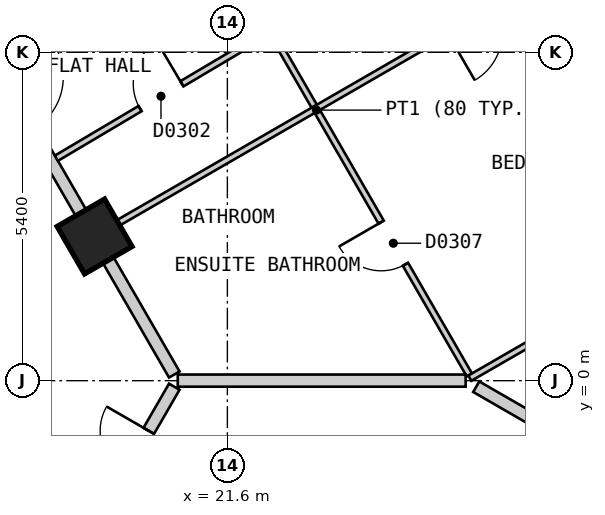
"""IFC4 building model, lengths in metres.
Left out: names, types, materials, properties, quantities, classifications, styles, units other than length and angle.
Written with IfcOpenShell. Run it as: python <this file> out.ifc"""

import sys

from ifc_helpers import new_model, si_unit, direction, frame, frame_2d, origin, origin_2d, place, context, subcontext, project, spatial, polyline, rectangle, outline, extrude, element, fill, save


model = new_model("IFC4")
c1 = context("Model", 3, precision=1e-05, world=origin(), true_north=direction((0.0, 1.0)))
c2 = subcontext(c1, "Body", "Model", "MODEL_VIEW")
j1 = project(units=[si_unit("LENGTHUNIT", "METRE"), si_unit("PLANEANGLEUNIT", "RADIAN")], contexts=[c1])
p1 = place(None, origin())
s1 = spatial("IfcSite", under=j1, at=p1, CompositionType="ELEMENT")
p2 = place(p1, origin())
s2 = spatial("IfcBuilding", under=s1, at=p2, CompositionType="ELEMENT")
p3 = place(p2, frame((0.0, 0.0, 59.4)))
s3 = spatial("IfcBuildingStorey", under=s2, at=p3, CompositionType="ELEMENT", Elevation=59.4)
p4 = place(p3, frame((19.416, 2.371, 0.0), z_axis=(0.0, 0.0, 1.0), x_axis=(-0.499984884929, 0.866034130299, 0.0)))
e1 = element("IfcColumn", 1, at=p4, inside=s3, PredefinedType="COLUMN", context=c2, shape_type="SweptSolid", body=[
    extrude(rectangle(XDim=0.9, YDim=0.9, at=origin_2d()), origin(), (0.0, 0.0, 1.0), 3.0),
])
p5 = place(p3, frame((31.22, 2.425, 0.0), z_axis=(0.0, 0.0, 1.0), x_axis=(-0.500001938803, 0.866024284413, 0.0)))
e2 = element("IfcWall", 2, at=p5, inside=s3, PredefinedType="SOLIDWALL", context=c2, shape_type="SweptSolid", body=[
    extrude(outline(polyline([(0.0, -0.15), (27.02, -0.15), (26.94, 0.15), (0.08, 0.15), (0.0, -0.15)])), origin(), (0.0, 0.0, 1.0), 2.6),
])
p6 = place(p5, frame((1.277, 0.0, 0.15)))
e3 = element("IfcOpeningElement", 3, at=p6, cuts=e2, PredefinedType="OPENING", context=c2, shape_type="SweptSolid", body=[
    extrude(rectangle(XDim=1.5, YDim=2.1, at=frame_2d((0.75, 1.05))), frame((0.0, 0.16, 0.0), z_axis=(0.0, -1.0, 0.0), x_axis=(1.0, 0.0, 0.0)), (0.0, 0.0, 1.0), 0.32),
])
p7 = place(p5, frame((3.829, 0.0, 0.15)))
e4 = element("IfcOpeningElement", 4, at=p7, cuts=e2, PredefinedType="OPENING", context=c2, shape_type="SweptSolid", body=[
    extrude(rectangle(XDim=1.5, YDim=2.1, at=frame_2d((0.75, 1.05))), frame((0.0, 0.16, 0.0), z_axis=(0.0, -1.0, 0.0), x_axis=(1.0, 0.0, 0.0)), (0.0, 0.0, 1.0), 0.32),
])
p8 = place(p5, frame((6.382, 0.0, 0.15)))
e5 = element("IfcOpeningElement", 5, at=p8, cuts=e2, PredefinedType="OPENING", context=c2, shape_type="SweptSolid", body=[
    extrude(rectangle(XDim=1.5, YDim=2.1, at=frame_2d((0.75, 1.05))), frame((0.0, 0.16, 0.0), z_axis=(0.0, -1.0, 0.0), x_axis=(1.0, 0.0, 0.0)), (0.0, 0.0, 1.0), 0.32),
])
p9 = place(p5, frame((8.933, 0.0, 0.15)))
e6 = element("IfcOpeningElement", 6, at=p9, cuts=e2, PredefinedType="OPENING", context=c2, shape_type="SweptSolid", body=[
    extrude(rectangle(XDim=1.5, YDim=2.1, at=frame_2d((0.75, 1.05))), frame((0.0, 0.16, 0.0), z_axis=(0.0, -1.0, 0.0), x_axis=(1.0, 0.0, 0.0)), (0.0, 0.0, 1.0), 0.32),
])
p10 = place(p5, frame((11.485, 0.0, 0.15)))
e7 = element("IfcOpeningElement", 7, at=p10, cuts=e2, PredefinedType="OPENING", context=c2, shape_type="SweptSolid", body=[
    extrude(rectangle(XDim=1.5, YDim=2.1, at=frame_2d((0.75, 1.05))), frame((0.0, 0.16, 0.0), z_axis=(0.0, -1.0, 0.0), x_axis=(1.0, 0.0, 0.0)), (0.0, 0.0, 1.0), 0.32),
])
p11 = place(p5, frame((14.037, 0.0, 0.15)))
e8 = element("IfcOpeningElement", 8, at=p11, cuts=e2, PredefinedType="OPENING", context=c2, shape_type="SweptSolid", body=[
    extrude(rectangle(XDim=1.5, YDim=2.1, at=frame_2d((0.75, 1.05))), frame((0.0, 0.16, 0.0), z_axis=(0.0, -1.0, 0.0), x_axis=(1.0, 0.0, 0.0)), (0.0, 0.0, 1.0), 0.32),
])
p12 = place(p5, frame((16.589, 0.0, 0.15)))
e9 = element("IfcOpeningElement", 9, at=p12, cuts=e2, PredefinedType="OPENING", context=c2, shape_type="SweptSolid", body=[
    extrude(rectangle(XDim=1.5, YDim=2.1, at=frame_2d((0.75, 1.05))), frame((0.0, 0.16, 0.0), z_axis=(0.0, -1.0, 0.0), x_axis=(1.0, 0.0, 0.0)), (0.0, 0.0, 1.0), 0.32),
])
p13 = place(p5, frame((19.141, 0.0, 0.15)))
e10 = element("IfcOpeningElement", 10, at=p13, cuts=e2, PredefinedType="OPENING", context=c2, shape_type="SweptSolid", body=[
    extrude(rectangle(XDim=1.5, YDim=2.1, at=frame_2d((0.75, 1.05))), frame((0.0, 0.16, 0.0), z_axis=(0.0, -1.0, 0.0), x_axis=(1.0, 0.0, 0.0)), (0.0, 0.0, 1.0), 0.32),
])
p14 = place(p5, frame((21.693, 0.0, 0.15)))
e11 = element("IfcOpeningElement", 11, at=p14, cuts=e2, PredefinedType="OPENING", context=c2, shape_type="SweptSolid", body=[
    extrude(rectangle(XDim=1.5, YDim=2.1, at=frame_2d((0.75, 1.05))), frame((0.0, 0.16, 0.0), z_axis=(0.0, -1.0, 0.0), x_axis=(1.0, 0.0, 0.0)), (0.0, 0.0, 1.0), 0.32),
])
p15 = place(p5, frame((24.244, 0.0, 0.15)))
e12 = element("IfcOpeningElement", 12, at=p15, cuts=e2, PredefinedType="OPENING", context=c2, shape_type="SweptSolid", body=[
    extrude(rectangle(XDim=1.5, YDim=2.1, at=frame_2d((0.75, 1.05))), frame((0.0, 0.16, 0.0), z_axis=(0.0, -1.0, 0.0), x_axis=(1.0, 0.0, 0.0)), (0.0, 0.0, 1.0), 0.32),
])
p16 = place(p3, frame((10.45, 17.9, 0.0), z_axis=(0.0, 0.0, 1.0), x_axis=(0.500034352617, -0.866005569383, 0.0)))
e13 = element("IfcWall", 13, at=p16, inside=s3, PredefinedType="PARTITIONING", context=c2, shape_type="SweptSolid", body=[
    extrude(rectangle(XDim=20.553, YDim=0.2, at=frame_2d((10.276, 0.0))), origin(), (0.0, 0.0, 1.0), 2.6),
])
p17 = place(p16, frame((14.903, 0.0, 0.0)))
e14 = element("IfcOpeningElement", 14, at=p17, cuts=e13, PredefinedType="OPENING", context=c2, shape_type="SweptSolid", body=[
    extrude(rectangle(XDim=1.0, YDim=2.1, at=frame_2d((0.5, 1.05))), frame((0.0, 0.11, 0.0), z_axis=(0.0, -1.0, 0.0), x_axis=(1.0, 0.0, 0.0)), (0.0, 0.0, 1.0), 0.22),
])
p18 = place(p16, frame((9.775, 0.0, 0.0)))
e15 = element("IfcOpeningElement", 15, at=p18, cuts=e13, PredefinedType="OPENING", context=c2, shape_type="SweptSolid", body=[
    extrude(rectangle(XDim=1.0, YDim=2.1, at=frame_2d((0.5, 1.05))), frame((0.0, 0.11, 0.0), z_axis=(0.0, -1.0, 0.0), x_axis=(1.0, 0.0, 0.0)), (0.0, 0.0, 1.0), 0.22),
])
p19 = place(p16, frame((0.852, 0.0, 0.0)))
e16 = element("IfcOpeningElement", 16, at=p19, cuts=e13, PredefinedType="OPENING", context=c2, shape_type="SweptSolid", body=[
    extrude(rectangle(XDim=0.8, YDim=2.1, at=frame_2d((0.4, 1.05))), frame((0.0, 0.11, 0.0), z_axis=(0.0, -1.0, 0.0), x_axis=(1.0, 0.0, 0.0)), (0.0, 0.0, 1.0), 0.22),
])
p20 = place(p3, frame((16.914, -6.703, 0.0), z_axis=(0.0, 0.0, 1.0), x_axis=(0.50003007663, 0.866008038338, 0.0)))
e17 = element("IfcWall", 17, at=p20, inside=s3, PredefinedType="PARTITIONING", context=c2, shape_type="SweptSolid", body=[
    extrude(rectangle(XDim=7.625, YDim=0.2, at=frame_2d((3.813, 0.0))), origin(), (0.0, 0.0, 1.0), 2.6),
])
p21 = place(p20, frame((1.952, 0.0, 0.0)))
e18 = element("IfcOpeningElement", 18, at=p21, cuts=e17, PredefinedType="OPENING", context=c2, shape_type="SweptSolid", body=[
    extrude(rectangle(XDim=1.0, YDim=2.1, at=frame_2d((0.5, 1.05))), frame((0.0, 0.11, 0.0), z_axis=(0.0, -1.0, 0.0), x_axis=(1.0, 0.0, 0.0)), (0.0, 0.0, 1.0), 0.22),
])
p22 = place(p20, frame((5.987, 0.0, 0.0)))
e19 = element("IfcOpeningElement", 19, at=p22, cuts=e17, PredefinedType="OPENING", context=c2, shape_type="SweptSolid", body=[
    extrude(rectangle(XDim=0.8, YDim=2.1, at=frame_2d((0.4, 1.05))), frame((0.0, 0.11, 0.0), z_axis=(0.0, -1.0, 0.0), x_axis=(1.0, 0.0, 0.0)), (0.0, 0.0, 1.0), 0.22),
])
p23 = place(p3, frame((20.551, 8.805, 0.0), z_axis=(0.0, 0.0, 1.0), x_axis=(0.499984387913, -0.86603441724, 0.0)))
e20 = element("IfcWall", 20, at=p23, inside=s3, PredefinedType="PARTITIONING", context=c2, shape_type="SweptSolid", body=[
    extrude(rectangle(XDim=10.058, YDim=0.1, at=frame_2d((5.029, 0.0))), origin(), (0.0, 0.0, 1.0), 2.6),
])
p24 = place(p23, frame((1.978, 0.0, 0.0)))
e21 = element("IfcOpeningElement", 21, at=p24, cuts=e20, PredefinedType="OPENING", context=c2, shape_type="SweptSolid", body=[
    extrude(rectangle(XDim=0.9, YDim=2.1, at=frame_2d((0.45, 1.05))), frame((0.0, 0.06, 0.0), z_axis=(0.0, -1.0, 0.0), x_axis=(1.0, 0.0, 0.0)), (0.0, 0.0, 1.0), 0.12),
])
p25 = place(p23, frame((7.157, 0.0, 0.0)))
e22 = element("IfcOpeningElement", 22, at=p25, cuts=e20, PredefinedType="OPENING", context=c2, shape_type="SweptSolid", body=[
    extrude(rectangle(XDim=0.8, YDim=2.1, at=frame_2d((0.4, 1.05))), frame((0.0, 0.06, 0.0), z_axis=(0.0, -1.0, 0.0), x_axis=(1.0, 0.0, 0.0)), (0.0, 0.0, 1.0), 0.12),
])
p26 = place(p3, frame((19.503, 2.421, 0.0), z_axis=(0.0, 0.0, 1.0), x_axis=(0.866083434238, 0.499899474834, 0.0)))
e23 = element("IfcWall", 23, at=p26, inside=s3, PredefinedType="PARTITIONING", context=c2, shape_type="SweptSolid", body=[
    extrude(rectangle(XDim=4.099, YDim=0.1, at=frame_2d((2.049, 0.0))), origin(), (0.0, 0.0, 1.0), 2.6),
])
p27 = place(p3, frame((25.588, 0.041, 0.0), z_axis=(0.0, 0.0, 1.0), x_axis=(0.866113484451, 0.499847408768, 0.0)))
e24 = element("IfcWall", 24, at=p27, inside=s3, PredefinedType="PARTITIONING", context=c2, shape_type="SweptSolid", body=[
    extrude(rectangle(XDim=5.92, YDim=0.1, at=frame_2d((2.96, 0.0))), origin(), (0.0, 0.0, 1.0), 2.6),
])
p28 = place(p27, frame((2.51, 0.0, 0.0)))
e25 = element("IfcOpeningElement", 25, at=p28, cuts=e24, PredefinedType="OPENING", context=c2, shape_type="SweptSolid", body=[
    extrude(rectangle(XDim=0.9, YDim=2.1, at=frame_2d((0.45, 1.05))), frame((0.0, 0.06, 0.0), z_axis=(0.0, -1.0, 0.0), x_axis=(1.0, 0.0, 0.0)), (0.0, 0.0, 1.0), 0.12),
])
p29 = place(p3, frame((18.788, 3.658, 0.0), z_axis=(0.0, 0.0, 1.0), x_axis=(0.860114269096, 0.510101405701, 0.0)))
e26 = element("IfcWall", 26, at=p29, inside=s3, PredefinedType="PARTITIONING", context=c2, shape_type="SweptSolid", body=[
    extrude(rectangle(XDim=4.051, YDim=0.1, at=frame_2d((2.025, 0.0))), origin(), (0.0, 0.0, 1.0), 2.6),
])
p30 = place(p29, frame((1.6, 0.0, 0.0)))
e27 = element("IfcOpeningElement", 27, at=p30, cuts=e26, PredefinedType="OPENING", context=c2, shape_type="SweptSolid", body=[
    extrude(rectangle(XDim=0.8, YDim=2.1, at=frame_2d((0.4, 1.05))), frame((0.0, 0.06, 0.0), z_axis=(0.0, -1.0, 0.0), x_axis=(1.0, 0.0, 0.0)), (0.0, 0.0, 1.0), 0.12),
])
p31 = place(p3, frame((25.693, -0.099, 0.0), z_axis=(0.0, 0.0, 1.0), x_axis=(0.866032775405, -0.499987231761, 0.0)))
e28 = element("IfcWall", 28, at=p31, inside=s3, PredefinedType="PARTITIONING", context=c2, shape_type="SweptSolid", body=[
    extrude(rectangle(XDim=5.8, YDim=0.2, at=frame_2d((2.9, 0.0))), origin(), (0.0, 0.0, 1.0), 2.6),
])
p32 = place(p3, frame((20.784, 0.001, 0.0), z_axis=(0.0, 0.0, 1.0), x_axis=(1.0, 0.0, 0.0)))
e29 = element("IfcWall", 29, at=p32, inside=s3, PredefinedType="PARTITIONING", context=c2, shape_type="SweptSolid", body=[
    extrude(rectangle(XDim=4.735, YDim=0.2, at=frame_2d((2.368, 0.0))), origin(), (0.0, 0.0, 1.0), 2.6),
])
p33 = place(p3, frame((23.053, 4.47, 0.0), z_axis=(0.0, 0.0, 1.0), x_axis=(0.866052608538, 0.499952877023, 0.0)))
e30 = element("IfcWall", 30, at=p33, inside=s3, PredefinedType="PARTITIONING", context=c2, shape_type="SweptSolid", body=[
    extrude(rectangle(XDim=5.9, YDim=0.1, at=frame_2d((2.95, 0.0))), origin(), (0.0, 0.0, 1.0), 2.6),
])
p34 = place(p33, frame((2.501, 0.0, 0.0)))
e31 = element("IfcOpeningElement", 31, at=p34, cuts=e30, PredefinedType="OPENING", context=c2, shape_type="SweptSolid", body=[
    extrude(rectangle(XDim=0.9, YDim=2.1, at=frame_2d((0.45, 1.05))), frame((0.0, 0.06, 0.0), z_axis=(0.0, -1.0, 0.0), x_axis=(1.0, 0.0, 0.0)), (0.0, 0.0, 1.0), 0.12),
])
p35 = place(p30, origin())
e32 = element("IfcDoor", 32, at=p35, inside=s3, OperationType="SINGLE_SWING_RIGHT", PredefinedType="DOOR", context=c2, shape_type="SweptSolid", body=[
    extrude(rectangle(XDim=0.8, YDim=2.1, at=frame_2d((0.4, 1.05))), frame((0.0, 0.025, 0.0), z_axis=(0.0, -1.0, 0.0), x_axis=(1.0, 0.0, 0.0)), (0.0, 0.0, 1.0), 0.05),
])
fill(e27, e32)
p36 = place(p25, origin())
e33 = element("IfcDoor", 33, at=p36, inside=s3, OperationType="SINGLE_SWING_LEFT", PredefinedType="DOOR", context=c2, shape_type="SweptSolid", body=[
    extrude(rectangle(XDim=0.8, YDim=2.1, at=frame_2d((0.4, 1.05))), frame((0.0, 0.025, 0.0), z_axis=(0.0, -1.0, 0.0), x_axis=(1.0, 0.0, 0.0)), (0.0, 0.0, 1.0), 0.05),
])
fill(e22, e33)
p37 = place(p22, origin())
e34 = element("IfcDoor", 34, at=p37, inside=s3, OperationType="SINGLE_SWING_RIGHT", PredefinedType="DOOR", context=c2, shape_type="SweptSolid", body=[
    extrude(rectangle(XDim=0.8, YDim=2.1, at=frame_2d((0.4, 1.05))), frame((0.0, 0.025, 0.0), z_axis=(0.0, -1.0, 0.0), x_axis=(1.0, 0.0, 0.0)), (0.0, 0.0, 1.0), 0.05),
])
fill(e19, e34)
save(model, sys.argv[1])
